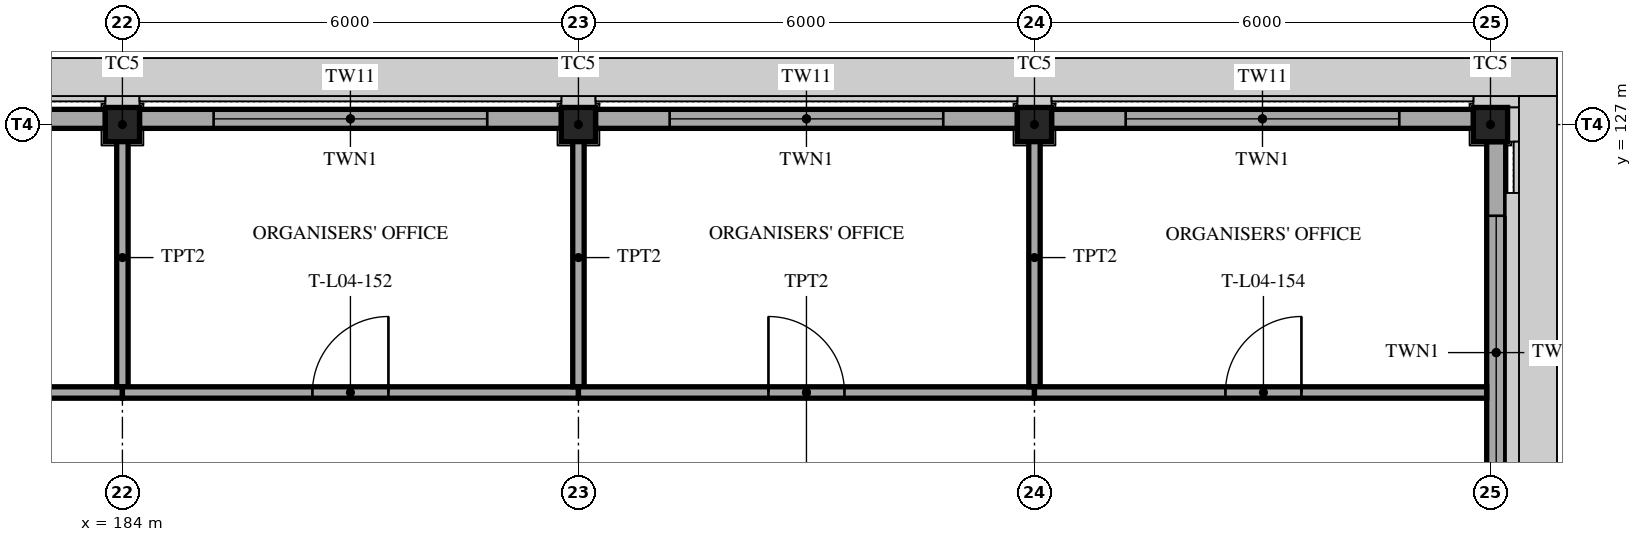
"""IFC4 building model, lengths in metres.
Left out: names, types, materials, properties, quantities, classifications, styles, units other than length and angle.
Written with IfcOpenShell. Run it as: python <this file> out.ifc"""

import sys

from ifc_helpers import new_model, si_unit, direction, frame, frame_2d, origin, origin_2d, place, context, subcontext, project, spatial, polyline, rectangle, hollow_rectangle, outline, extrude, element, fill, save


model = new_model("IFC4")
c1 = context("Model", 3, precision=1e-05, world=origin(), true_north=direction((0.0, 1.0)))
c2 = subcontext(c1, "Body", "Model", "MODEL_VIEW")
j1 = project(units=[si_unit("LENGTHUNIT", "METRE"), si_unit("PLANEANGLEUNIT", "RADIAN")], contexts=[c1])
p1 = place(None, origin())
s1 = spatial("IfcSite", under=j1, at=p1, CompositionType="ELEMENT")
p2 = place(p1, origin())
s2 = spatial("IfcBuilding", under=s1, at=p2, CompositionType="ELEMENT")
p3 = place(p2, frame((0.0, 0.0, 19.2)))
s3 = spatial("IfcBuildingStorey", under=s2, at=p3, CompositionType="ELEMENT", Elevation=19.2)
for number, where, z_axis, x_axis in (
    (1, (202.0, 127.0, 0.0), (0.0, 0.0, 1.0), (1.0, 0.0, 0.0)),
    (2, (184.0, 127.0, 0.0), (0.0, 0.0, 1.0), (1.0, 0.0, 0.0)),
    (3, (190.0, 127.0, 0.0), (0.0, 0.0, 1.0), (1.0, 0.0, 0.0)),
    (4, (196.0, 127.0, 0.0), (0.0, 0.0, 1.0), (1.0, 0.0, 0.0)),
):
    element("IfcColumn", number, at=place(p3, frame(where, z_axis=z_axis, x_axis=x_axis)), inside=s3, PredefinedType="COLUMN", context=c2, shape_type="SweptSolid", body=[
        extrude(hollow_rectangle(XDim=0.45, YDim=0.45, WallThickness=0.025, at=origin_2d()), origin(), (0.0, 0.0, 1.0), 4.2),
    ])
p4 = place(p3, frame((178.225, 127.075, 0.0), z_axis=(0.0, 0.0, 1.0), x_axis=(1.0, 0.0, 0.0)))
e5 = element("IfcWall", 5, at=p4, inside=s3, PredefinedType="SOLIDWALL", context=c2, shape_type="SweptSolid", body=[
    extrude(rectangle(XDim=5.55, YDim=0.25, at=frame_2d((2.775, 0.0))), origin(), (0.0, 0.0, 1.0), 3.55),
])
p5 = place(p4, frame((0.975, 0.0, 0.9)))
e6 = element("IfcOpeningElement", 6, at=p5, cuts=e5, PredefinedType="OPENING", context=c2, shape_type="SweptSolid", body=[
    extrude(rectangle(XDim=3.6, YDim=2.4, at=frame_2d((1.8, 1.2))), frame((0.0, 0.135, 0.0), z_axis=(0.0, -1.0, 0.0), x_axis=(1.0, 0.0, 0.0)), (0.0, 0.0, 1.0), 0.27),
])
p6 = place(p3, frame((184.225, 127.075, 0.0), z_axis=(0.0, 0.0, 1.0), x_axis=(1.0, 0.0, 0.0)))
e7 = element("IfcWall", 7, at=p6, inside=s3, PredefinedType="SOLIDWALL", context=c2, shape_type="SweptSolid", body=[
    extrude(rectangle(XDim=5.55, YDim=0.25, at=frame_2d((2.775, 0.0))), origin(), (0.0, 0.0, 1.0), 3.55),
])
p7 = place(p6, frame((0.975, 0.0, 0.9)))
e8 = element("IfcOpeningElement", 8, at=p7, cuts=e7, PredefinedType="OPENING", context=c2, shape_type="SweptSolid", body=[
    extrude(rectangle(XDim=3.6, YDim=2.4, at=frame_2d((1.8, 1.2))), frame((0.0, 0.135, 0.0), z_axis=(0.0, -1.0, 0.0), x_axis=(1.0, 0.0, 0.0)), (0.0, 0.0, 1.0), 0.27),
])
p8 = place(p3, frame((190.225, 127.075, 0.0), z_axis=(0.0, 0.0, 1.0), x_axis=(1.0, 0.0, 0.0)))
e9 = element("IfcWall", 9, at=p8, inside=s3, PredefinedType="SOLIDWALL", context=c2, shape_type="SweptSolid", body=[
    extrude(rectangle(XDim=5.55, YDim=0.25, at=frame_2d((2.775, 0.0))), origin(), (0.0, 0.0, 1.0), 3.55),
])
p9 = place(p8, frame((0.975, 0.0, 0.9)))
e10 = element("IfcOpeningElement", 10, at=p9, cuts=e9, PredefinedType="OPENING", context=c2, shape_type="SweptSolid", body=[
    extrude(rectangle(XDim=3.6, YDim=2.4, at=frame_2d((1.8, 1.2))), frame((0.0, 0.135, 0.0), z_axis=(0.0, -1.0, 0.0), x_axis=(1.0, 0.0, 0.0)), (0.0, 0.0, 1.0), 0.27),
])
p10 = place(p3, frame((196.225, 127.075, 0.0), z_axis=(0.0, 0.0, 1.0), x_axis=(1.0, 0.0, 0.0)))
e11 = element("IfcWall", 11, at=p10, inside=s3, PredefinedType="SOLIDWALL", context=c2, shape_type="SweptSolid", body=[
    extrude(rectangle(XDim=5.55, YDim=0.25, at=frame_2d((2.775, 0.0))), origin(), (0.0, 0.0, 1.0), 3.55),
])
p11 = place(p10, frame((0.975, 0.0, 0.9)))
e12 = element("IfcOpeningElement", 12, at=p11, cuts=e11, PredefinedType="OPENING", context=c2, shape_type="SweptSolid", body=[
    extrude(rectangle(XDim=3.6, YDim=2.4, at=frame_2d((1.8, 1.2))), frame((0.0, 0.135, 0.0), z_axis=(0.0, -1.0, 0.0), x_axis=(1.0, 0.0, 0.0)), (0.0, 0.0, 1.0), 0.27),
])
p12 = place(p3, frame((202.075, 121.225, 0.0), z_axis=(0.0, 0.0, 1.0), x_axis=(0.0, 1.0, 0.0)))
e13 = element("IfcWall", 13, at=p12, inside=s3, PredefinedType="SOLIDWALL", context=c2, shape_type="SweptSolid", body=[
    extrude(rectangle(XDim=5.55, YDim=0.25, at=frame_2d((2.775, 0.0))), origin(), (0.0, 0.0, 1.0), 3.55),
])
p13 = place(p12, frame((0.975, 0.0, 0.9)))
e14 = element("IfcOpeningElement", 14, at=p13, cuts=e13, PredefinedType="OPENING", context=c2, shape_type="SweptSolid", body=[
    extrude(rectangle(XDim=3.6, YDim=2.4, at=frame_2d((1.8, 1.2))), frame((0.0, 0.135, 0.0), z_axis=(0.0, -1.0, 0.0), x_axis=(1.0, 0.0, 0.0)), (0.0, 0.0, 1.0), 0.27),
])
p14 = place(p3, frame((178.0, 123.475, 0.0), z_axis=(0.0, 0.0, 1.0), x_axis=(1.0, 0.0, 0.0)))
e15 = element("IfcWall", 15, at=p14, inside=s3, PredefinedType="PARTITIONING", context=c2, shape_type="SweptSolid", body=[
    extrude(rectangle(XDim=6.0, YDim=0.15, at=frame_2d((3.0, 0.0))), origin(), (0.0, 0.0, 1.0), 3.45),
])
p15 = place(p14, frame((2.5, 0.0, 0.0)))
e16 = element("IfcOpeningElement", 16, at=p15, cuts=e15, PredefinedType="OPENING", context=c2, shape_type="SweptSolid", body=[
    extrude(rectangle(XDim=1.0, YDim=2.1, at=frame_2d((0.5, 1.05))), frame((0.0, 0.085, 0.0), z_axis=(0.0, -1.0, 0.0), x_axis=(1.0, 0.0, 0.0)), (0.0, 0.0, 1.0), 0.17),
])
p16 = place(p3, frame((184.0, 123.55, 0.0), z_axis=(0.0, 0.0, 1.0), x_axis=(0.0, 1.0, 0.0)))
e17 = element("IfcWall", 17, at=p16, inside=s3, PredefinedType="PARTITIONING", context=c2, shape_type="SweptSolid", body=[
    extrude(rectangle(XDim=3.4, YDim=0.15, at=frame_2d((1.7, 0.0))), origin(), (0.0, 0.0, 1.0), 3.45),
])
p17 = place(p3, frame((184.0, 123.475, 0.0), z_axis=(0.0, 0.0, 1.0), x_axis=(1.0, 0.0, 0.0)))
e18 = element("IfcWall", 18, at=p17, inside=s3, PredefinedType="PARTITIONING", context=c2, shape_type="SweptSolid", body=[
    extrude(rectangle(XDim=6.0, YDim=0.15, at=frame_2d((3.0, 0.0))), origin(), (0.0, 0.0, 1.0), 3.45),
])
p18 = place(p17, frame((2.5, 0.0, 0.0)))
e19 = element("IfcOpeningElement", 19, at=p18, cuts=e18, PredefinedType="OPENING", context=c2, shape_type="SweptSolid", body=[
    extrude(rectangle(XDim=1.0, YDim=2.1, at=frame_2d((0.5, 1.05))), frame((0.0, 0.085, 0.0), z_axis=(0.0, -1.0, 0.0), x_axis=(1.0, 0.0, 0.0)), (0.0, 0.0, 1.0), 0.17),
])
p19 = place(p3, frame((190.0, 123.55, 0.0), z_axis=(0.0, 0.0, 1.0), x_axis=(0.0, 1.0, 0.0)))
e20 = element("IfcWall", 20, at=p19, inside=s3, PredefinedType="PARTITIONING", context=c2, shape_type="SweptSolid", body=[
    extrude(rectangle(XDim=3.4, YDim=0.15, at=frame_2d((1.7, 0.0))), origin(), (0.0, 0.0, 1.0), 3.45),
])
p20 = place(p3, frame((190.0, 123.475, 0.0), z_axis=(0.0, 0.0, 1.0), x_axis=(1.0, 0.0, 0.0)))
e21 = element("IfcWall", 21, at=p20, inside=s3, PredefinedType="PARTITIONING", context=c2, shape_type="SweptSolid", body=[
    extrude(rectangle(XDim=6.0, YDim=0.15, at=frame_2d((3.0, 0.0))), origin(), (0.0, 0.0, 1.0), 3.45),
])
p21 = place(p20, frame((2.5, 0.0, 0.0)))
e22 = element("IfcOpeningElement", 22, at=p21, cuts=e21, PredefinedType="OPENING", context=c2, shape_type="SweptSolid", body=[
    extrude(rectangle(XDim=1.0, YDim=2.1, at=frame_2d((0.5, 1.05))), frame((0.0, 0.085, 0.0), z_axis=(0.0, -1.0, 0.0), x_axis=(1.0, 0.0, 0.0)), (0.0, 0.0, 1.0), 0.17),
])
p22 = place(p3, frame((196.0, 123.55, 0.0), z_axis=(0.0, 0.0, 1.0), x_axis=(0.0, 1.0, 0.0)))
e23 = element("IfcWall", 23, at=p22, inside=s3, PredefinedType="PARTITIONING", context=c2, shape_type="SweptSolid", body=[
    extrude(rectangle(XDim=3.4, YDim=0.15, at=frame_2d((1.7, 0.0))), origin(), (0.0, 0.0, 1.0), 3.45),
])
p23 = place(p3, frame((196.0, 123.475, 0.0), z_axis=(0.0, 0.0, 1.0), x_axis=(1.0, 0.0, 0.0)))
e24 = element("IfcWall", 24, at=p23, inside=s3, PredefinedType="PARTITIONING", context=c2, shape_type="SweptSolid", body=[
    extrude(rectangle(XDim=5.95, YDim=0.15, at=frame_2d((2.975, 0.0))), origin(), (0.0, 0.0, 1.0), 3.45),
])
p24 = place(p23, frame((2.512, 0.0, 0.0)))
e25 = element("IfcOpeningElement", 25, at=p24, cuts=e24, PredefinedType="OPENING", context=c2, shape_type="SweptSolid", body=[
    extrude(rectangle(XDim=1.0, YDim=2.1, at=frame_2d((0.5, 1.05))), frame((0.0, 0.085, 0.0), z_axis=(0.0, -1.0, 0.0), x_axis=(1.0, 0.0, 0.0)), (0.0, 0.0, 1.0), 0.17),
])
p25 = place(p7, origin())
e26 = element("IfcWindow", 26, at=p25, inside=s3, PartitioningType="TRIPLE_PANEL_VERTICAL", PredefinedType="WINDOW", context=c2, shape_type="SweptSolid", body=[
    extrude(outline(polyline([(0.0, 0.0), (3.6, 0.0), (3.6, 2.4), (0.0, 2.4), (0.0, 0.0)]), holes=[polyline([(0.06, 0.06), (0.96, 0.06), (0.96, 2.34), (0.06, 2.34), (0.06, 0.06)]), polyline([(1.06, 0.06), (2.54, 0.06), (2.54, 2.34), (1.06, 2.34), (1.06, 0.06)]), polyline([(2.64, 0.06), (3.54, 0.06), (3.54, 2.34), (2.64, 2.34), (2.64, 0.06)])]), frame((0.0, 0.03, 0.0), z_axis=(0.0, -1.0, 0.0), x_axis=(1.0, 0.0, 0.0)), (0.0, 0.0, 1.0), 0.06),
    extrude(rectangle(XDim=0.924, YDim=2.304, at=frame_2d((0.51, 1.2))), frame((0.0, 0.01, 0.0), z_axis=(0.0, -1.0, 0.0), x_axis=(1.0, 0.0, 0.0)), (0.0, 0.0, 1.0), 0.02),
    extrude(rectangle(XDim=1.504, YDim=2.304, at=frame_2d((1.8, 1.2))), frame((0.0, 0.01, 0.0), z_axis=(0.0, -1.0, 0.0), x_axis=(1.0, 0.0, 0.0)), (0.0, 0.0, 1.0), 0.02),
    extrude(rectangle(XDim=0.924, YDim=2.304, at=frame_2d((3.09, 1.2))), frame((0.0, 0.01, 0.0), z_axis=(0.0, -1.0, 0.0), x_axis=(1.0, 0.0, 0.0)), (0.0, 0.0, 1.0), 0.02),
])
fill(e8, e26)
p26 = place(p9, origin())
e27 = element("IfcWindow", 27, at=p26, inside=s3, PartitioningType="TRIPLE_PANEL_VERTICAL", PredefinedType="WINDOW", context=c2, shape_type="SweptSolid", body=[
    extrude(outline(polyline([(0.0, 0.0), (3.6, 0.0), (3.6, 2.4), (0.0, 2.4), (0.0, 0.0)]), holes=[polyline([(0.06, 0.06), (0.96, 0.06), (0.96, 2.34), (0.06, 2.34), (0.06, 0.06)]), polyline([(1.06, 0.06), (2.54, 0.06), (2.54, 2.34), (1.06, 2.34), (1.06, 0.06)]), polyline([(2.64, 0.06), (3.54, 0.06), (3.54, 2.34), (2.64, 2.34), (2.64, 0.06)])]), frame((0.0, 0.03, 0.0), z_axis=(0.0, -1.0, 0.0), x_axis=(1.0, 0.0, 0.0)), (0.0, 0.0, 1.0), 0.06),
    extrude(rectangle(XDim=0.924, YDim=2.304, at=frame_2d((0.51, 1.2))), frame((0.0, 0.01, 0.0), z_axis=(0.0, -1.0, 0.0), x_axis=(1.0, 0.0, 0.0)), (0.0, 0.0, 1.0), 0.02),
    extrude(rectangle(XDim=1.504, YDim=2.304, at=frame_2d((1.8, 1.2))), frame((0.0, 0.01, 0.0), z_axis=(0.0, -1.0, 0.0), x_axis=(1.0, 0.0, 0.0)), (0.0, 0.0, 1.0), 0.02),
    extrude(rectangle(XDim=0.924, YDim=2.304, at=frame_2d((3.09, 1.2))), frame((0.0, 0.01, 0.0), z_axis=(0.0, -1.0, 0.0), x_axis=(1.0, 0.0, 0.0)), (0.0, 0.0, 1.0), 0.02),
])
fill(e10, e27)
p27 = place(p11, origin())
e28 = element("IfcWindow", 28, at=p27, inside=s3, PartitioningType="TRIPLE_PANEL_VERTICAL", PredefinedType="WINDOW", context=c2, shape_type="SweptSolid", body=[
    extrude(outline(polyline([(0.0, 0.0), (3.6, 0.0), (3.6, 2.4), (0.0, 2.4), (0.0, 0.0)]), holes=[polyline([(0.06, 0.06), (0.96, 0.06), (0.96, 2.34), (0.06, 2.34), (0.06, 0.06)]), polyline([(1.06, 0.06), (2.54, 0.06), (2.54, 2.34), (1.06, 2.34), (1.06, 0.06)]), polyline([(2.64, 0.06), (3.54, 0.06), (3.54, 2.34), (2.64, 2.34), (2.64, 0.06)])]), frame((0.0, 0.03, 0.0), z_axis=(0.0, -1.0, 0.0), x_axis=(1.0, 0.0, 0.0)), (0.0, 0.0, 1.0), 0.06),
    extrude(rectangle(XDim=0.924, YDim=2.304, at=frame_2d((0.51, 1.2))), frame((0.0, 0.01, 0.0), z_axis=(0.0, -1.0, 0.0), x_axis=(1.0, 0.0, 0.0)), (0.0, 0.0, 1.0), 0.02),
    extrude(rectangle(XDim=1.504, YDim=2.304, at=frame_2d((1.8, 1.2))), frame((0.0, 0.01, 0.0), z_axis=(0.0, -1.0, 0.0), x_axis=(1.0, 0.0, 0.0)), (0.0, 0.0, 1.0), 0.02),
    extrude(rectangle(XDim=0.924, YDim=2.304, at=frame_2d((3.09, 1.2))), frame((0.0, 0.01, 0.0), z_axis=(0.0, -1.0, 0.0), x_axis=(1.0, 0.0, 0.0)), (0.0, 0.0, 1.0), 0.02),
])
fill(e12, e28)
p28 = place(p13, origin())
e29 = element("IfcWindow", 29, at=p28, inside=s3, PartitioningType="TRIPLE_PANEL_VERTICAL", PredefinedType="WINDOW", context=c2, shape_type="SweptSolid", body=[
    extrude(outline(polyline([(0.0, 0.0), (3.6, 0.0), (3.6, 2.4), (0.0, 2.4), (0.0, 0.0)]), holes=[polyline([(0.06, 0.06), (0.96, 0.06), (0.96, 2.34), (0.06, 2.34), (0.06, 0.06)]), polyline([(1.06, 0.06), (2.54, 0.06), (2.54, 2.34), (1.06, 2.34), (1.06, 0.06)]), polyline([(2.64, 0.06), (3.54, 0.06), (3.54, 2.34), (2.64, 2.34), (2.64, 0.06)])]), frame((0.0, 0.03, 0.0), z_axis=(0.0, -1.0, 0.0), x_axis=(1.0, 0.0, 0.0)), (0.0, 0.0, 1.0), 0.06),
    extrude(rectangle(XDim=0.924, YDim=2.304, at=frame_2d((0.51, 1.2))), frame((0.0, 0.01, 0.0), z_axis=(0.0, -1.0, 0.0), x_axis=(1.0, 0.0, 0.0)), (0.0, 0.0, 1.0), 0.02),
    extrude(rectangle(XDim=1.504, YDim=2.304, at=frame_2d((1.8, 1.2))), frame((0.0, 0.01, 0.0), z_axis=(0.0, -1.0, 0.0), x_axis=(1.0, 0.0, 0.0)), (0.0, 0.0, 1.0), 0.02),
    extrude(rectangle(XDim=0.924, YDim=2.304, at=frame_2d((3.09, 1.2))), frame((0.0, 0.01, 0.0), z_axis=(0.0, -1.0, 0.0), x_axis=(1.0, 0.0, 0.0)), (0.0, 0.0, 1.0), 0.02),
])
fill(e14, e29)
p29 = place(p18, origin())
e30 = element("IfcDoor", 30, at=p29, inside=s3, OperationType="SINGLE_SWING_RIGHT", PredefinedType="DOOR", context=c2, shape_type="SweptSolid", body=[
    extrude(rectangle(XDim=1.0, YDim=2.1, at=frame_2d((0.5, 1.05))), frame((0.0, 0.025, 0.0), z_axis=(0.0, -1.0, 0.0), x_axis=(1.0, 0.0, 0.0)), (0.0, 0.0, 1.0), 0.05),
])
fill(e19, e30)
p30 = place(p21, origin())
e31 = element("IfcDoor", 31, at=p30, inside=s3, OperationType="SINGLE_SWING_LEFT", PredefinedType="DOOR", context=c2, shape_type="SweptSolid", body=[
    extrude(rectangle(XDim=1.0, YDim=2.1, at=frame_2d((0.5, 1.05))), frame((0.0, 0.025, 0.0), z_axis=(0.0, -1.0, 0.0), x_axis=(1.0, 0.0, 0.0)), (0.0, 0.0, 1.0), 0.05),
])
fill(e22, e31)
p31 = place(p24, origin())
e32 = element("IfcDoor", 32, at=p31, inside=s3, OperationType="SINGLE_SWING_RIGHT", PredefinedType="DOOR", context=c2, shape_type="SweptSolid", body=[
    extrude(rectangle(XDim=1.0, YDim=2.1, at=frame_2d((0.5, 1.05))), frame((0.0, 0.025, 0.0), z_axis=(0.0, -1.0, 0.0), x_axis=(1.0, 0.0, 0.0)), (0.0, 0.0, 1.0), 0.05),
])
fill(e25, e32)
save(model, sys.argv[1])
